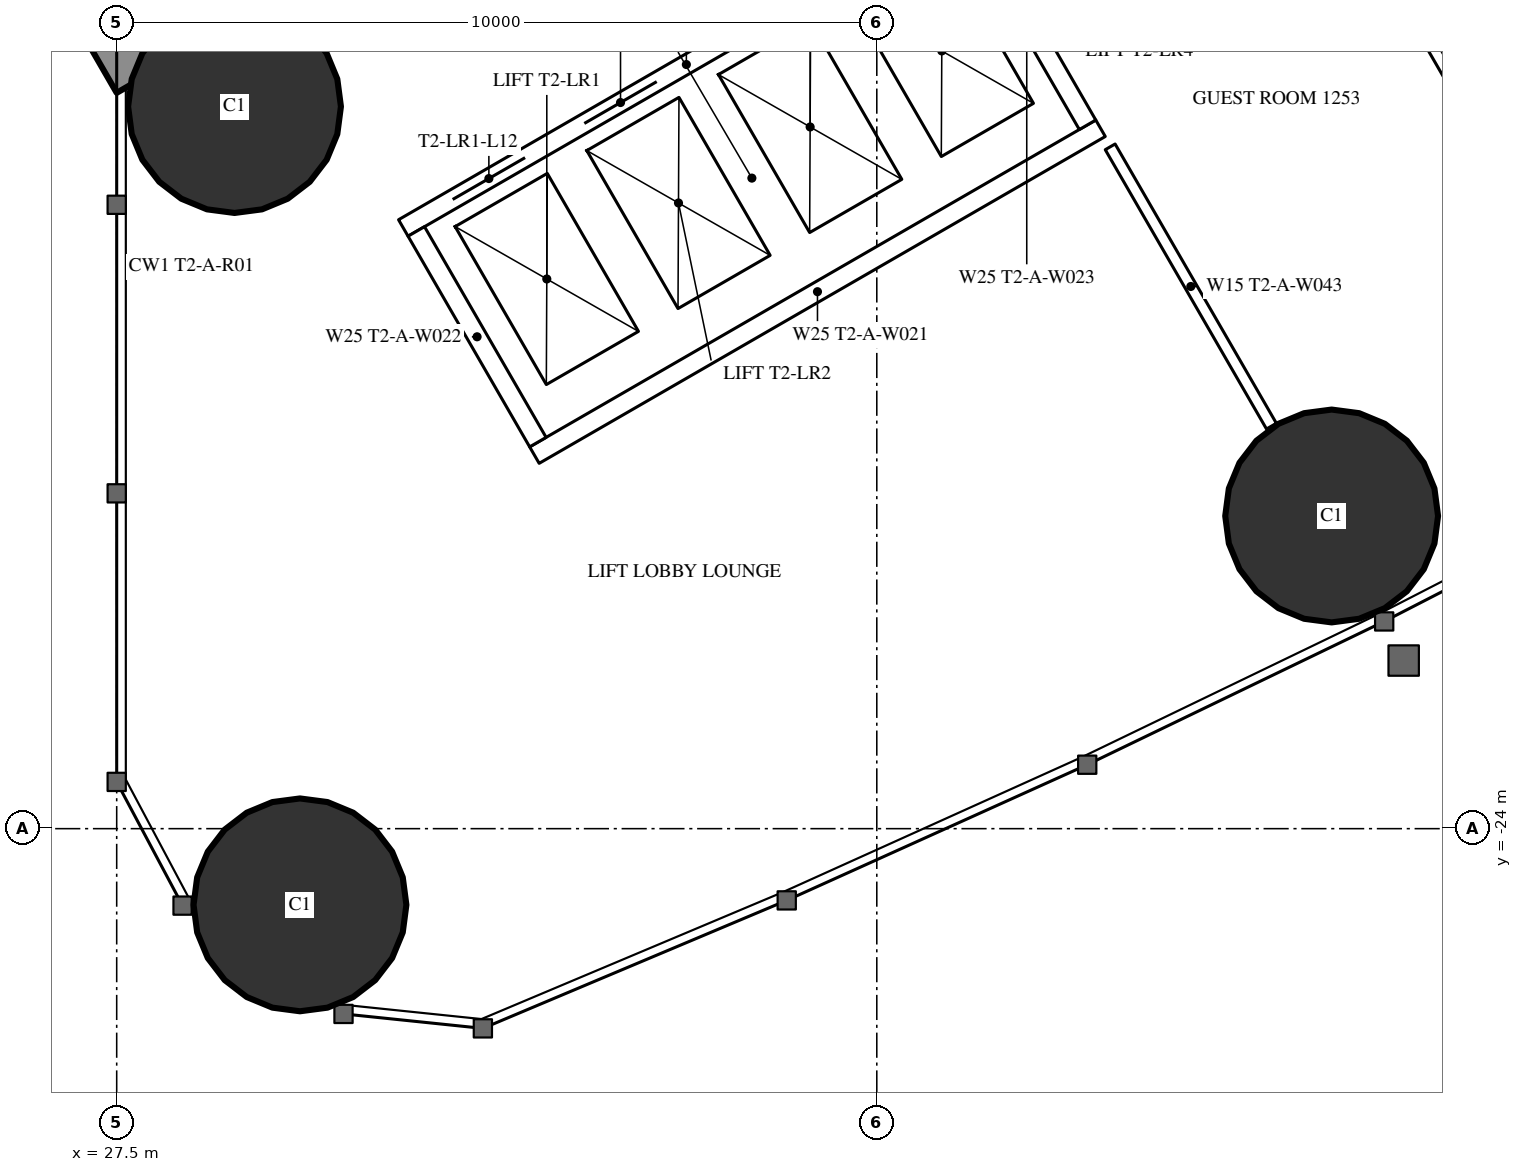
"""IFC4 building model, lengths in metres.
Left out: names, types, materials, properties, quantities, classifications, styles, units other than length and angle.
Written with IfcOpenShell. Run it as: python <this file> out.ifc"""

import sys

from ifc_helpers import new_model, si_unit, direction, frame, frame_2d, origin, origin_2d, place, context, subcontext, project, spatial, rectangle, hollow_circle, extrude, element, fill, save


model = new_model("IFC4")
c1 = context("Model", 3, precision=1e-05, world=origin(), true_north=direction((0.0, 1.0)))
c2 = subcontext(c1, "Body", "Model", "MODEL_VIEW")
j1 = project(units=[si_unit("LENGTHUNIT", "METRE"), si_unit("PLANEANGLEUNIT", "RADIAN")], contexts=[c1])
p1 = place(None, origin())
s1 = spatial("IfcSite", under=j1, at=p1, CompositionType="ELEMENT")
p2 = place(p1, origin())
s2 = spatial("IfcBuilding", under=s1, at=p2, CompositionType="ELEMENT")
p3 = place(p2, frame((0.0, 0.0, 49.5)))
s3 = spatial("IfcBuildingStorey", under=s2, at=p3, CompositionType="ELEMENT", Elevation=49.5)
for number, where, z_axis, x_axis in (
    (1, (29.911, -25.002, 0.0), (0.0, 0.0, 1.0), (1.0, 0.0, 0.0)),
    (2, (29.05, -14.5, 0.0), (0.0, 0.0, 1.0), (1.0, 0.0, 0.0)),
    (3, (43.484, -19.886, 0.0), (0.0, 0.0, 1.0), (1.0, 0.0, 0.0)),
):
    element("IfcColumn", number, at=place(p3, frame(where, z_axis=z_axis, x_axis=x_axis)), inside=s3, PredefinedType="COLUMN", context=c2, shape_type="SweptSolid", body=[
        extrude(hollow_circle(Radius=1.4, WallThickness=0.12, at=origin_2d()), origin(), (0.0, 0.0, 1.0), 3.5),
    ])
p4 = place(p3, frame((27.2, -13.8, 0.0), z_axis=(0.0, 0.0, 1.0), x_axis=(0.866027159892, 0.499996958321, 0.0)))
e4 = element("IfcWall", 4, at=p4, inside=s3, PredefinedType="SHEAR", context=c2, shape_type="SweptSolid", body=[
    extrude(rectangle(XDim=27.947, YDim=1.2, at=frame_2d((13.973, 0.0))), origin(), (0.0, 0.0, 1.0), 3.5),
])
p5 = place(p4, frame((4.6, 0.0, 0.0)))
e5 = element("IfcOpeningElement", 5, at=p5, cuts=e4, PredefinedType="OPENING", context=c2, shape_type="SweptSolid", body=[
    extrude(rectangle(XDim=1.0, YDim=2.2, at=frame_2d((0.5, 1.1))), frame((0.0, 0.61, 0.0), z_axis=(0.0, -1.0, 0.0), x_axis=(1.0, 0.0, 0.0)), (0.0, 0.0, 1.0), 1.22),
])
p6 = place(p4, frame((13.395, 0.0, 0.0)))
e6 = element("IfcOpeningElement", 6, at=p6, cuts=e4, PredefinedType="OPENING", context=c2, shape_type="SweptSolid", body=[
    extrude(rectangle(XDim=1.8, YDim=2.2, at=frame_2d((0.9, 1.1))), frame((0.0, 0.61, 0.0), z_axis=(0.0, -1.0, 0.0), x_axis=(1.0, 0.0, 0.0)), (0.0, 0.0, 1.0), 1.22),
])
p7 = place(p3, frame((41.647, -8.23, 0.0), z_axis=(0.0, 0.0, 1.0), x_axis=(0.49998590462, -0.866033541603, 0.0)))
e7 = element("IfcWall", 7, at=p7, inside=s3, PredefinedType="PARTITIONING", context=c2, shape_type="SweptSolid", body=[
    extrude(rectangle(XDim=12.621, YDim=0.15, at=frame_2d((6.311, 0.0))), origin(), (0.0, 0.0, 1.0), 3.25),
])
p8 = place(p3, frame((40.57, -15.03, 0.0), z_axis=(0.0, 0.0, 1.0), x_axis=(0.500012993597, -0.866017901798, 0.0)))
e8 = element("IfcWall", 8, at=p8, inside=s3, PredefinedType="PARTITIONING", context=c2, shape_type="SweptSolid", body=[
    extrude(rectangle(XDim=4.243, YDim=0.15, at=frame_2d((2.122, 0.0))), origin(), (0.0, 0.0, 1.0), 3.25),
])
p9 = place(p3, frame((31.271, -16.097, 0.0), z_axis=(0.0, 0.0, 1.0), x_axis=(0.86604045752, 0.499973925258, 0.0)))
e9 = element("IfcWall", 9, at=p9, inside=s3, PredefinedType="PARTITIONING", context=c2, shape_type="SweptSolid", body=[
    extrude(rectangle(XDim=8.6, YDim=0.25, at=frame_2d((4.3, 0.0))), origin(), (0.0, 0.0, 1.0), 3.25),
])
p10 = place(p9, frame((0.75, 0.0, 0.0)))
e10 = element("IfcOpeningElement", 10, at=p10, cuts=e9, PredefinedType="OPENING", context=c2, shape_type="SweptSolid", body=[
    extrude(rectangle(XDim=1.1, YDim=2.2, at=frame_2d((0.55, 1.1))), frame((0.0, 0.135, 0.0), z_axis=(0.0, -1.0, 0.0), x_axis=(1.0, 0.0, 0.0)), (0.0, 0.0, 1.0), 0.27),
])
p11 = place(p9, frame((2.75, 0.0, 0.0)))
e11 = element("IfcOpeningElement", 11, at=p11, cuts=e9, PredefinedType="OPENING", context=c2, shape_type="SweptSolid", body=[
    extrude(rectangle(XDim=1.1, YDim=2.2, at=frame_2d((0.55, 1.1))), frame((0.0, 0.135, 0.0), z_axis=(0.0, -1.0, 0.0), x_axis=(1.0, 0.0, 0.0)), (0.0, 0.0, 1.0), 0.27),
])
p12 = place(p9, frame((4.75, 0.0, 0.0)))
e12 = element("IfcOpeningElement", 12, at=p12, cuts=e9, PredefinedType="OPENING", context=c2, shape_type="SweptSolid", body=[
    extrude(rectangle(XDim=1.1, YDim=2.2, at=frame_2d((0.55, 1.1))), frame((0.0, 0.135, 0.0), z_axis=(0.0, -1.0, 0.0), x_axis=(1.0, 0.0, 0.0)), (0.0, 0.0, 1.0), 0.27),
])
p13 = place(p9, frame((6.75, 0.0, 0.0)))
e13 = element("IfcOpeningElement", 13, at=p13, cuts=e9, PredefinedType="OPENING", context=c2, shape_type="SweptSolid", body=[
    extrude(rectangle(XDim=1.1, YDim=2.2, at=frame_2d((0.55, 1.1))), frame((0.0, 0.135, 0.0), z_axis=(0.0, -1.0, 0.0), x_axis=(1.0, 0.0, 0.0)), (0.0, 0.0, 1.0), 0.27),
])
p14 = place(p3, frame((32.996, -19.086, 0.0), z_axis=(0.0, 0.0, 1.0), x_axis=(0.866028165386, 0.499995216735, 0.0)))
e14 = element("IfcWall", 14, at=p14, inside=s3, PredefinedType="PARTITIONING", context=c2, shape_type="SweptSolid", body=[
    extrude(rectangle(XDim=8.6, YDim=0.25, at=frame_2d((4.3, 0.0))), origin(), (0.0, 0.0, 1.0), 3.25),
])
for number, where, z_axis, x_axis in (
    (15, (31.441, -16.143, 0.0), (0.0, 0.0, 1.0), (0.5, -0.866, 0.0)),
    (16, (38.673, -11.968, 0.0), (0.0, 0.0, 1.0), (0.5, -0.866, 0.0)),
):
    element("IfcWall", number, at=place(p3, frame(where, z_axis=z_axis, x_axis=x_axis)), inside=s3, PredefinedType="PARTITIONING", context=c2, shape_type="SweptSolid", body=[
        extrude(rectangle(XDim=3.201, YDim=0.25, at=frame_2d((1.6, 0.0))), origin(), (0.0, 0.0, 1.0), 3.25),
    ])
p15 = place(p10, origin())
e17 = element("IfcDoor", 17, at=p15, inside=s3, OperationType="DOUBLE_DOOR_SLIDING", PredefinedType="USERDEFINED", context=c2, shape_type="SweptSolid", body=[
    extrude(rectangle(XDim=1.1, YDim=2.2, at=frame_2d((0.55, 1.1))), frame((0.0, 0.025, 0.0), z_axis=(0.0, -1.0, 0.0), x_axis=(1.0, 0.0, 0.0)), (0.0, 0.0, 1.0), 0.05),
])
fill(e10, e17)
p16 = place(p11, origin())
e18 = element("IfcDoor", 18, at=p16, inside=s3, OperationType="DOUBLE_DOOR_SLIDING", PredefinedType="USERDEFINED", context=c2, shape_type="SweptSolid", body=[
    extrude(rectangle(XDim=1.1, YDim=2.2, at=frame_2d((0.55, 1.1))), frame((0.0, 0.025, 0.0), z_axis=(0.0, -1.0, 0.0), x_axis=(1.0, 0.0, 0.0)), (0.0, 0.0, 1.0), 0.05),
])
fill(e11, e18)
save(model, sys.argv[1])
